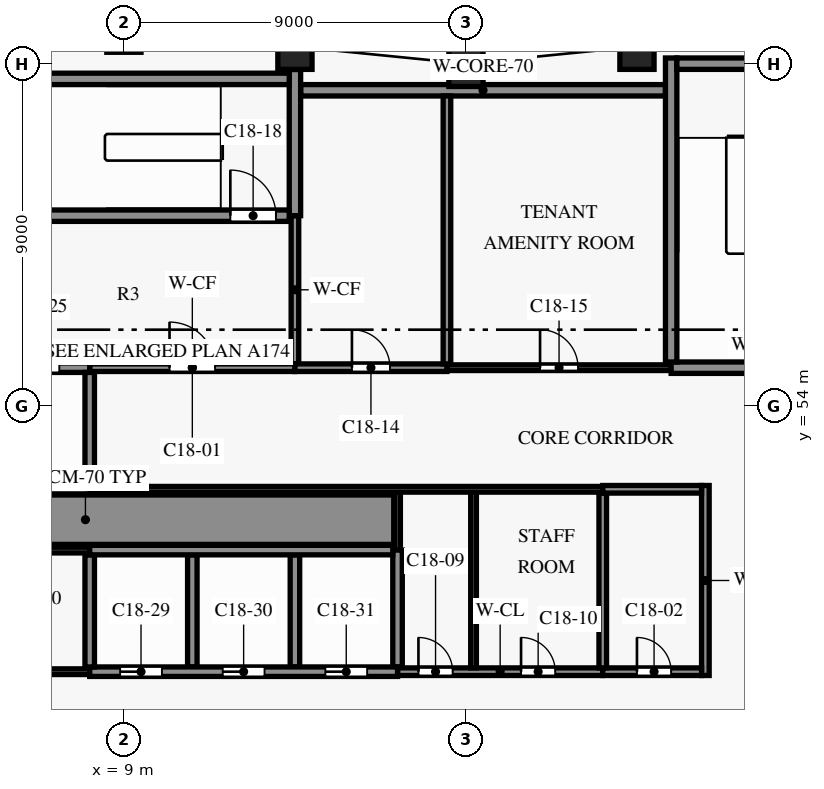
"""IFC4 building model, lengths in metres.
Left out: names, types, materials, properties, quantities, classifications, styles, units other than length and angle.
Written with IfcOpenShell. Run it as: python <this file> out.ifc"""

import sys

from ifc_helpers import new_model, si_unit, direction, frame, frame_2d, origin, origin_2d, place, context, subcontext, project, spatial, rectangle, extrude, element, fill, save


model = new_model("IFC4")
c1 = context("Model", 3, precision=1e-05, world=origin(), true_north=direction((0.0, 1.0)))
c2 = subcontext(c1, "Body", "Model", "MODEL_VIEW")
j1 = project(units=[si_unit("LENGTHUNIT", "METRE"), si_unit("PLANEANGLEUNIT", "RADIAN")], contexts=[c1])
p1 = place(None, origin())
s1 = spatial("IfcSite", under=j1, at=p1, CompositionType="ELEMENT")
p2 = place(p1, origin())
s2 = spatial("IfcBuilding", under=s1, at=p2, CompositionType="ELEMENT")
p3 = place(p2, frame((0.0, 0.0, 130.3)))
s3 = spatial("IfcBuildingStorey", under=s2, at=p3, CompositionType="ELEMENT", Elevation=130.3)
for number, where, z_axis, x_axis in (
    (1, (22.5, 63.45, 0.0), (0.0, 0.0, 1.0), (-0.995, -0.1, 0.0)),
    (2, (18.0, 63.0, 0.0), (0.0, 0.0, 1.0), (-1.0, 0.0, 0.0)),
    (3, (13.5, 63.45, 0.0), (0.0, 0.0, 1.0), (-0.995, 0.1, 0.0)),
    (4, (9.0, 63.9, 0.0), (0.0, 0.0, 1.0), (-1.0, 0.0, 0.0)),
):
    element("IfcColumn", number, at=place(p3, frame(where, z_axis=z_axis, x_axis=x_axis)), inside=s3, PredefinedType="COLUMN", context=c2, shape_type="SweptSolid", body=[
        extrude(rectangle(XDim=0.9, YDim=1.2, at=origin_2d()), origin(), (0.0, 0.0, 1.0), 3.8),
    ])
p4 = place(p3, frame((16.2, 47.0, 0.0), z_axis=(0.0, 0.0, 1.0), x_axis=(1.0, 0.0, 0.0)))
e5 = element("IfcWall", 5, at=p4, inside=s3, PredefinedType="PARTITIONING", context=c2, shape_type="SweptSolid", body=[
    extrude(rectangle(XDim=5.4, YDim=0.2, at=frame_2d((2.7, 0.0))), origin(), (0.0, 0.0, 1.0), 3.5),
])
p5 = place(p4, frame((0.55, 0.0, 0.0)))
e6 = element("IfcOpeningElement", 6, at=p5, cuts=e5, PredefinedType="OPENING", context=c2, shape_type="SweptSolid", body=[
    extrude(rectangle(XDim=0.9, YDim=2.1, at=frame_2d((0.45, 1.05))), frame((0.0, 0.11, 0.0), z_axis=(0.0, -1.0, 0.0), x_axis=(1.0, 0.0, 0.0)), (0.0, 0.0, 1.0), 0.22),
])
p6 = place(p4, frame((3.25, 0.0, 0.0)))
e7 = element("IfcOpeningElement", 7, at=p6, cuts=e5, PredefinedType="OPENING", context=c2, shape_type="SweptSolid", body=[
    extrude(rectangle(XDim=0.9, YDim=2.1, at=frame_2d((0.45, 1.05))), frame((0.0, 0.11, 0.0), z_axis=(0.0, -1.0, 0.0), x_axis=(1.0, 0.0, 0.0)), (0.0, 0.0, 1.0), 0.22),
])
p7 = place(p3, frame((0.15, 47.0, 0.0), z_axis=(0.0, 0.0, 1.0), x_axis=(1.0, 0.0, 0.0)))
e8 = element("IfcWall", 8, at=p7, inside=s3, PredefinedType="PARTITIONING", context=c2, shape_type="SweptSolid", body=[
    extrude(rectangle(XDim=7.95, YDim=0.15, at=frame_2d((3.975, 0.0))), origin(), (0.0, 0.0, 1.0), 3.5),
])
p8 = place(p7, frame((0.725, 0.0, 0.0)))
e9 = element("IfcOpeningElement", 9, at=p8, cuts=e8, PredefinedType="OPENING", context=c2, shape_type="SweptSolid", body=[
    extrude(rectangle(XDim=0.9, YDim=2.1, at=frame_2d((0.45, 1.05))), frame((0.0, 0.085, 0.0), z_axis=(0.0, -1.0, 0.0), x_axis=(1.0, 0.0, 0.0)), (0.0, 0.0, 1.0), 0.17),
])
p9 = place(p7, frame((4.45, 0.0, 0.0)))
e10 = element("IfcOpeningElement", 10, at=p9, cuts=e8, PredefinedType="OPENING", context=c2, shape_type="SweptSolid", body=[
    extrude(rectangle(XDim=0.9, YDim=2.1, at=frame_2d((0.45, 1.05))), frame((0.0, 0.085, 0.0), z_axis=(0.0, -1.0, 0.0), x_axis=(1.0, 0.0, 0.0)), (0.0, 0.0, 1.0), 0.17),
])
p10 = place(p3, frame((21.6, 47.0, 0.0), z_axis=(0.0, 0.0, 1.0), x_axis=(1.0, 0.0, 0.0)))
e11 = element("IfcWall", 11, at=p10, inside=s3, PredefinedType="PARTITIONING", context=c2, shape_type="SweptSolid", body=[
    extrude(rectangle(XDim=2.6, YDim=0.2, at=frame_2d((1.3, 0.0))), origin(), (0.0, 0.0, 1.0), 3.5),
])
p11 = place(p10, frame((0.9, 0.0, 0.0)))
e12 = element("IfcOpeningElement", 12, at=p11, cuts=e11, PredefinedType="OPENING", context=c2, shape_type="SweptSolid", body=[
    extrude(rectangle(XDim=0.9, YDim=2.1, at=frame_2d((0.45, 1.05))), frame((0.0, 0.11, 0.0), z_axis=(0.0, -1.0, 0.0), x_axis=(1.0, 0.0, 0.0)), (0.0, 0.0, 1.0), 0.22),
])
p12 = place(p3, frame((8.1, 47.0, 0.0), z_axis=(0.0, 0.0, 1.0), x_axis=(1.0, 0.0, 0.0)))
e13 = element("IfcWall", 13, at=p12, inside=s3, PredefinedType="SHEAR", context=c2, shape_type="SweptSolid", body=[
    extrude(rectangle(XDim=8.1, YDim=0.25, at=frame_2d((4.05, 0.0))), origin(), (0.0, 0.0, 1.0), 3.5),
])
p13 = place(p12, frame((0.8, 0.0, 0.0)))
e14 = element("IfcOpeningElement", 14, at=p13, cuts=e13, PredefinedType="OPENING", context=c2, shape_type="SweptSolid", body=[
    extrude(rectangle(XDim=1.1, YDim=2.1, at=frame_2d((0.55, 1.05))), frame((0.0, 0.135, 0.0), z_axis=(0.0, -1.0, 0.0), x_axis=(1.0, 0.0, 0.0)), (0.0, 0.0, 1.0), 0.27),
])
p14 = place(p12, frame((3.5, 0.0, 0.0)))
e15 = element("IfcOpeningElement", 15, at=p14, cuts=e13, PredefinedType="OPENING", context=c2, shape_type="SweptSolid", body=[
    extrude(rectangle(XDim=1.1, YDim=2.1, at=frame_2d((0.55, 1.05))), frame((0.0, 0.135, 0.0), z_axis=(0.0, -1.0, 0.0), x_axis=(1.0, 0.0, 0.0)), (0.0, 0.0, 1.0), 0.27),
])
p15 = place(p12, frame((6.2, 0.0, 0.0)))
e16 = element("IfcOpeningElement", 16, at=p15, cuts=e13, PredefinedType="OPENING", context=c2, shape_type="SweptSolid", body=[
    extrude(rectangle(XDim=1.1, YDim=2.1, at=frame_2d((0.55, 1.05))), frame((0.0, 0.135, 0.0), z_axis=(0.0, -1.0, 0.0), x_axis=(1.0, 0.0, 0.0)), (0.0, 0.0, 1.0), 0.27),
])
p16 = place(p3, frame((0.15, 50.2, 0.0), z_axis=(0.0, 0.0, 1.0), x_axis=(1.0, 0.0, 0.0)))
e17 = element("IfcWall", 17, at=p16, inside=s3, PredefinedType="PARTITIONING", context=c2, shape_type="SweptSolid", body=[
    extrude(rectangle(XDim=7.95, YDim=0.15, at=frame_2d((3.975, 0.0))), origin(), (0.0, 0.0, 1.0), 3.5),
])
p17 = place(p3, frame((8.1, 50.2, 0.0), z_axis=(0.0, 0.0, 1.0), x_axis=(1.0, 0.0, 0.0)))
e18 = element("IfcWall", 18, at=p17, inside=s3, PredefinedType="SHEAR", context=c2, shape_type="SweptSolid", body=[
    extrude(rectangle(XDim=7.975, YDim=0.25, at=frame_2d((3.987, 0.0))), origin(), (0.0, 0.0, 1.0), 3.5),
])
p18 = place(p3, frame((-0.125, 51.0, 0.0), z_axis=(0.0, 0.0, 1.0), x_axis=(1.0, 0.0, 0.0)))
e19 = element("IfcWall", 19, at=p18, inside=s3, PredefinedType="SHEAR", context=c2, shape_type="SweptSolid", body=[
    extrude(rectangle(XDim=16.225, YDim=1.3, at=frame_2d((8.113, 0.0))), origin(), (0.0, 0.0, 1.0), 3.5),
])
p19 = place(p3, frame((8.1, 51.8, 0.0), z_axis=(0.0, 0.0, 1.0), x_axis=(1.0, 0.0, 0.0)))
e20 = element("IfcWall", 20, at=p19, inside=s3, PredefinedType="PARTITIONING", context=c2, shape_type="SweptSolid", body=[
    extrude(rectangle(XDim=13.5, YDim=0.15, at=frame_2d((6.75, 0.0))), origin(), (0.0, 0.0, 1.0), 3.5),
])
p20 = place(p3, frame((21.6, 51.8, 0.0), z_axis=(0.0, 0.0, 1.0), x_axis=(1.0, 0.0, 0.0)))
e21 = element("IfcWall", 21, at=p20, inside=s3, PredefinedType="PARTITIONING", context=c2, shape_type="SweptSolid", body=[
    extrude(rectangle(XDim=2.6, YDim=0.2, at=frame_2d((1.3, 0.0))), origin(), (0.0, 0.0, 1.0), 3.5),
])
p21 = place(p3, frame((0.125, 51.8, 0.0), z_axis=(0.0, 0.0, 1.0), x_axis=(1.0, 0.0, 0.0)))
e22 = element("IfcWall", 22, at=p21, inside=s3, PredefinedType="SHEAR", context=c2, shape_type="SweptSolid", body=[
    extrude(rectangle(XDim=7.975, YDim=0.25, at=frame_2d((3.988, 0.0))), origin(), (0.0, 0.0, 1.0), 3.5),
])
p22 = place(p3, frame((8.1, 55.0, 0.0), z_axis=(0.0, 0.0, 1.0), x_axis=(1.0, 0.0, 0.0)))
e23 = element("IfcWall", 23, at=p22, inside=s3, PredefinedType="PARTITIONING", context=c2, shape_type="SweptSolid", body=[
    extrude(rectangle(XDim=5.4, YDim=0.2, at=frame_2d((2.7, 0.0))), origin(), (0.0, 0.0, 1.0), 3.5),
])
p23 = place(p22, frame((2.1, 0.0, 0.0)))
e24 = element("IfcOpeningElement", 24, at=p23, cuts=e23, PredefinedType="OPENING", context=c2, shape_type="SweptSolid", body=[
    extrude(rectangle(XDim=1.2, YDim=2.2, at=frame_2d((0.6, 1.1))), frame((0.0, 0.11, 0.0), z_axis=(0.0, -1.0, 0.0), x_axis=(1.0, 0.0, 0.0)), (0.0, 0.0, 1.0), 0.22),
])
p24 = place(p3, frame((17.5, 55.0, 0.0), z_axis=(0.0, 0.0, 1.0), x_axis=(1.0, 0.0, 0.0)))
e25 = element("IfcWall", 25, at=p24, inside=s3, PredefinedType="PARTITIONING", context=c2, shape_type="SweptSolid", body=[
    extrude(rectangle(XDim=5.9, YDim=0.15, at=frame_2d((2.95, 0.0))), origin(), (0.0, 0.0, 1.0), 3.5),
])
p25 = place(p24, frame((2.45, 0.0, 0.0)))
e26 = element("IfcOpeningElement", 26, at=p25, cuts=e25, PredefinedType="OPENING", context=c2, shape_type="SweptSolid", body=[
    extrude(rectangle(XDim=1.0, YDim=2.1, at=frame_2d((0.5, 1.05))), frame((0.0, 0.085, 0.0), z_axis=(0.0, -1.0, 0.0), x_axis=(1.0, 0.0, 0.0)), (0.0, 0.0, 1.0), 0.17),
])
p26 = place(p3, frame((13.5, 55.0, 0.0), z_axis=(0.0, 0.0, 1.0), x_axis=(1.0, 0.0, 0.0)))
e27 = element("IfcWall", 27, at=p26, inside=s3, PredefinedType="PARTITIONING", context=c2, shape_type="SweptSolid", body=[
    extrude(rectangle(XDim=4.0, YDim=0.2, at=frame_2d((2.0, 0.0))), origin(), (0.0, 0.0, 1.0), 3.5),
])
p27 = place(p26, frame((1.5, 0.0, 0.0)))
e28 = element("IfcOpeningElement", 28, at=p27, cuts=e27, PredefinedType="OPENING", context=c2, shape_type="SweptSolid", body=[
    extrude(rectangle(XDim=1.0, YDim=2.1, at=frame_2d((0.5, 1.05))), frame((0.0, 0.11, 0.0), z_axis=(0.0, -1.0, 0.0), x_axis=(1.0, 0.0, 0.0)), (0.0, 0.0, 1.0), 0.22),
])
p28 = place(p3, frame((0.15, 55.0, 0.0), z_axis=(0.0, 0.0, 1.0), x_axis=(1.0, 0.0, 0.0)))
e29 = element("IfcWall", 29, at=p28, inside=s3, PredefinedType="SHEAR", context=c2, shape_type="SweptSolid", body=[
    extrude(rectangle(XDim=7.95, YDim=0.25, at=frame_2d((3.975, 0.0))), origin(), (0.0, 0.0, 1.0), 3.5),
])
p29 = place(p28, frame((0.65, 0.0, 0.0)))
e30 = element("IfcOpeningElement", 30, at=p29, cuts=e29, PredefinedType="OPENING", context=c2, shape_type="SweptSolid", body=[
    extrude(rectangle(XDim=1.1, YDim=2.1, at=frame_2d((0.55, 1.05))), frame((0.0, 0.135, 0.0), z_axis=(0.0, -1.0, 0.0), x_axis=(1.0, 0.0, 0.0)), (0.0, 0.0, 1.0), 0.27),
])
p30 = place(p28, frame((3.35, 0.0, 0.0)))
e31 = element("IfcOpeningElement", 31, at=p30, cuts=e29, PredefinedType="OPENING", context=c2, shape_type="SweptSolid", body=[
    extrude(rectangle(XDim=1.1, YDim=2.1, at=frame_2d((0.55, 1.05))), frame((0.0, 0.135, 0.0), z_axis=(0.0, -1.0, 0.0), x_axis=(1.0, 0.0, 0.0)), (0.0, 0.0, 1.0), 0.27),
])
p31 = place(p28, frame((6.05, 0.0, 0.0)))
e32 = element("IfcOpeningElement", 32, at=p31, cuts=e29, PredefinedType="OPENING", context=c2, shape_type="SweptSolid", body=[
    extrude(rectangle(XDim=1.1, YDim=2.1, at=frame_2d((0.55, 1.05))), frame((0.0, 0.135, 0.0), z_axis=(0.0, -1.0, 0.0), x_axis=(1.0, 0.0, 0.0)), (0.0, 0.0, 1.0), 0.27),
])
p32 = place(p3, frame((23.4, 55.0, 0.0), z_axis=(0.0, 0.0, 1.0), x_axis=(1.0, 0.0, 0.0)))
e33 = element("IfcWall", 33, at=p32, inside=s3, PredefinedType="SHEAR", context=c2, shape_type="SweptSolid", body=[
    extrude(rectangle(XDim=3.45, YDim=0.3, at=frame_2d((1.725, 0.0))), origin(), (0.0, 0.0, 1.0), 3.5),
])
p33 = place(p3, frame((5.1, 59.0, 0.0), z_axis=(0.0, 0.0, 1.0), x_axis=(1.0, 0.0, 0.0)))
e34 = element("IfcWall", 34, at=p33, inside=s3, PredefinedType="SHEAR", context=c2, shape_type="SweptSolid", body=[
    extrude(rectangle(XDim=8.25, YDim=0.3, at=frame_2d((4.125, 0.0))), origin(), (0.0, 0.0, 1.0), 3.5),
])
p34 = place(p33, frame((6.7, 0.0, 0.0)))
e35 = element("IfcOpeningElement", 35, at=p34, cuts=e34, PredefinedType="OPENING", context=c2, shape_type="SweptSolid", body=[
    extrude(rectangle(XDim=1.2, YDim=2.2, at=frame_2d((0.6, 1.1))), frame((0.0, 0.16, 0.0), z_axis=(0.0, -1.0, 0.0), x_axis=(1.0, 0.0, 0.0)), (0.0, 0.0, 1.0), 0.32),
])
p35 = place(p3, frame((13.65, 62.3, 0.0), z_axis=(0.0, 0.0, 1.0), x_axis=(1.0, 0.0, 0.0)))
e36 = element("IfcWall", 36, at=p35, inside=s3, PredefinedType="SHEAR", context=c2, shape_type="SweptSolid", body=[
    extrude(rectangle(XDim=9.6, YDim=0.3, at=frame_2d((4.8, 0.0))), origin(), (0.0, 0.0, 1.0), 3.5),
])
p36 = place(p3, frame((5.65, 62.6, 0.0), z_axis=(0.0, 0.0, 1.0), x_axis=(1.0, 0.0, 0.0)))
e37 = element("IfcWall", 37, at=p36, inside=s3, PredefinedType="SHEAR", context=c2, shape_type="SweptSolid", body=[
    extrude(rectangle(XDim=7.7, YDim=0.3, at=frame_2d((3.85, 0.0))), origin(), (0.0, 0.0, 1.0), 3.5),
])
p37 = place(p3, frame((23.55, 63.0, 0.0), z_axis=(0.0, 0.0, 1.0), x_axis=(1.0, 0.0, 0.0)))
e38 = element("IfcWall", 38, at=p37, inside=s3, PredefinedType="SHEAR", context=c2, shape_type="SweptSolid", body=[
    extrude(rectangle(XDim=3.3, YDim=0.3, at=frame_2d((1.65, 0.0))), origin(), (0.0, 0.0, 1.0), 3.5),
])
for number, where, z_axis, x_axis in (
    (39, (8.1, 47.125, 0.0), (0.0, 0.0, 1.0), (0.0, 1.0, 0.0)),
    (40, (8.1, 51.925, 0.0), (0.0, 0.0, 1.0), (0.0, 1.0, 0.0)),
    (41, (10.8, 47.125, 0.0), (0.0, 0.0, 1.0), (0.0, 1.0, 0.0)),
):
    element("IfcWall", number, at=place(p3, frame(where, z_axis=z_axis, x_axis=x_axis)), inside=s3, PredefinedType="SHEAR", context=c2, shape_type="SweptSolid", body=[
        extrude(rectangle(XDim=2.95, YDim=0.25, at=frame_2d((1.475, 0.0))), origin(), (0.0, 0.0, 1.0), 3.5),
    ])
p38 = place(p3, frame((13.5, 55.1, 0.0), z_axis=(0.0, 0.0, 1.0), x_axis=(0.0, 1.0, 0.0)))
e42 = element("IfcWall", 42, at=p38, inside=s3, PredefinedType="PARTITIONING", context=c2, shape_type="SweptSolid", body=[
    extrude(rectangle(XDim=3.9, YDim=0.2, at=frame_2d((1.95, 0.0))), origin(), (0.0, 0.0, 1.0), 3.5),
])
p39 = place(p3, frame((13.5, 47.125, 0.0), z_axis=(0.0, 0.0, 1.0), x_axis=(0.0, 1.0, 0.0)))
e43 = element("IfcWall", 43, at=p39, inside=s3, PredefinedType="SHEAR", context=c2, shape_type="SweptSolid", body=[
    extrude(rectangle(XDim=2.95, YDim=0.25, at=frame_2d((1.475, 0.0))), origin(), (0.0, 0.0, 1.0), 3.5),
])
p40 = place(p3, frame((13.5, 59.0, 0.0), z_axis=(0.0, 0.0, 1.0), x_axis=(0.0, 1.0, 0.0)))
e44 = element("IfcWall", 44, at=p40, inside=s3, PredefinedType="SHEAR", context=c2, shape_type="SweptSolid", body=[
    extrude(rectangle(XDim=3.847, YDim=0.3, at=frame_2d((1.923, 0.0))), origin(), (0.0, 0.0, 1.0), 3.5),
])
p41 = place(p3, frame((16.2, 50.2, 0.0), z_axis=(0.0, 0.0, 1.0), x_axis=(0.0, 1.0, 0.0)))
e45 = element("IfcWall", 45, at=p41, inside=s3, PredefinedType="PARTITIONING", context=c2, shape_type="SweptSolid", body=[
    extrude(rectangle(XDim=1.525, YDim=0.15, at=frame_2d((0.763, 0.0))), origin(), (0.0, 0.0, 1.0), 3.5),
])
p42 = place(p3, frame((16.2, 47.125, 0.0), z_axis=(0.0, 0.0, 1.0), x_axis=(0.0, 1.0, 0.0)))
e46 = element("IfcWall", 46, at=p42, inside=s3, PredefinedType="SHEAR", context=c2, shape_type="SweptSolid", body=[
    extrude(rectangle(XDim=3.075, YDim=0.25, at=frame_2d((1.538, 0.0))), origin(), (0.0, 0.0, 1.0), 3.5),
])
p43 = place(p3, frame((17.5, 55.1, 0.0), z_axis=(0.0, 0.0, 1.0), x_axis=(0.0, 1.0, 0.0)))
e47 = element("IfcWall", 47, at=p43, inside=s3, PredefinedType="PARTITIONING", context=c2, shape_type="SweptSolid", body=[
    extrude(rectangle(XDim=7.05, YDim=0.2, at=frame_2d((3.525, 0.0))), origin(), (0.0, 0.0, 1.0), 3.5),
])
p44 = place(p3, frame((18.2, 47.1, 0.0), z_axis=(0.0, 0.0, 1.0), x_axis=(0.0, 1.0, 0.0)))
e48 = element("IfcWall", 48, at=p44, inside=s3, PredefinedType="PARTITIONING", context=c2, shape_type="SweptSolid", body=[
    extrude(rectangle(XDim=4.625, YDim=0.15, at=frame_2d((2.312, 0.0))), origin(), (0.0, 0.0, 1.0), 3.5),
])
p45 = place(p3, frame((21.6, 47.1, 0.0), z_axis=(0.0, 0.0, 1.0), x_axis=(0.0, 1.0, 0.0)))
e49 = element("IfcWall", 49, at=p45, inside=s3, PredefinedType="PARTITIONING", context=c2, shape_type="SweptSolid", body=[
    extrude(rectangle(XDim=4.6, YDim=0.2, at=frame_2d((2.3, 0.0))), origin(), (0.0, 0.0, 1.0), 3.5),
])
p46 = place(p3, frame((23.4, 55.15, 0.0), z_axis=(0.0, 0.0, 1.0), x_axis=(0.0, 1.0, 0.0)))
e50 = element("IfcWall", 50, at=p46, inside=s3, PredefinedType="SHEAR", context=c2, shape_type="SweptSolid", body=[
    extrude(rectangle(XDim=8.0, YDim=0.3, at=frame_2d((4.0, 0.0))), origin(), (0.0, 0.0, 1.0), 3.5),
])
p47 = place(p3, frame((24.3, 46.9, 0.0), z_axis=(0.0, 0.0, 1.0), x_axis=(0.0, 1.0, 0.0)))
e51 = element("IfcWall", 51, at=p47, inside=s3, PredefinedType="SHEAR", context=c2, shape_type="SweptSolid", body=[
    extrude(rectangle(XDim=5.0, YDim=0.2, at=frame_2d((2.5, 0.0))), origin(), (0.0, 0.0, 1.0), 3.5),
])
p48 = place(p23, origin())
e52 = element("IfcDoor", 52, at=p48, inside=s3, OperationType="SINGLE_SWING_RIGHT", PredefinedType="DOOR", context=c2, shape_type="SweptSolid", body=[
    extrude(rectangle(XDim=1.2, YDim=2.2, at=frame_2d((0.6, 1.1))), frame((0.0, 0.025, 0.0), z_axis=(0.0, -1.0, 0.0), x_axis=(1.0, 0.0, 0.0)), (0.0, 0.0, 1.0), 0.05),
])
fill(e24, e52)
p49 = place(p11, origin())
e53 = element("IfcDoor", 53, at=p49, inside=s3, OperationType="SINGLE_SWING_LEFT", PredefinedType="DOOR", context=c2, shape_type="SweptSolid", body=[
    extrude(rectangle(XDim=0.9, YDim=2.1, at=frame_2d((0.45, 1.05))), frame((0.0, 0.025, 0.0), z_axis=(0.0, -1.0, 0.0), x_axis=(1.0, 0.0, 0.0)), (0.0, 0.0, 1.0), 0.05),
])
fill(e12, e53)
p50 = place(p5, origin())
e54 = element("IfcDoor", 54, at=p50, inside=s3, OperationType="SINGLE_SWING_LEFT", PredefinedType="DOOR", context=c2, shape_type="SweptSolid", body=[
    extrude(rectangle(XDim=0.9, YDim=2.1, at=frame_2d((0.45, 1.05))), frame((0.0, 0.025, 0.0), z_axis=(0.0, -1.0, 0.0), x_axis=(1.0, 0.0, 0.0)), (0.0, 0.0, 1.0), 0.05),
])
fill(e6, e54)
p51 = place(p6, origin())
e55 = element("IfcDoor", 55, at=p51, inside=s3, OperationType="SINGLE_SWING_RIGHT", PredefinedType="DOOR", context=c2, shape_type="SweptSolid", body=[
    extrude(rectangle(XDim=0.9, YDim=2.1, at=frame_2d((0.45, 1.05))), frame((0.0, 0.025, 0.0), z_axis=(0.0, -1.0, 0.0), x_axis=(1.0, 0.0, 0.0)), (0.0, 0.0, 1.0), 0.05),
])
fill(e7, e55)
p52 = place(p27, origin())
e56 = element("IfcDoor", 56, at=p52, inside=s3, OperationType="SINGLE_SWING_LEFT", PredefinedType="DOOR", context=c2, shape_type="SweptSolid", body=[
    extrude(rectangle(XDim=1.0, YDim=2.1, at=frame_2d((0.5, 1.05))), frame((0.0, 0.025, 0.0), z_axis=(0.0, -1.0, 0.0), x_axis=(1.0, 0.0, 0.0)), (0.0, 0.0, 1.0), 0.05),
])
fill(e28, e56)
p53 = place(p25, origin())
e57 = element("IfcDoor", 57, at=p53, inside=s3, OperationType="SINGLE_SWING_RIGHT", PredefinedType="DOOR", context=c2, shape_type="SweptSolid", body=[
    extrude(rectangle(XDim=1.0, YDim=2.1, at=frame_2d((0.5, 1.05))), frame((0.0, 0.025, 0.0), z_axis=(0.0, -1.0, 0.0), x_axis=(1.0, 0.0, 0.0)), (0.0, 0.0, 1.0), 0.05),
])
fill(e26, e57)
p54 = place(p34, origin())
e58 = element("IfcDoor", 58, at=p54, inside=s3, OperationType="SINGLE_SWING_RIGHT", PredefinedType="DOOR", context=c2, shape_type="SweptSolid", body=[
    extrude(rectangle(XDim=1.2, YDim=2.2, at=frame_2d((0.6, 1.1))), frame((0.0, 0.025, 0.0), z_axis=(0.0, -1.0, 0.0), x_axis=(1.0, 0.0, 0.0)), (0.0, 0.0, 1.0), 0.05),
])
fill(e35, e58)
p55 = place(p31, origin())
e59 = element("IfcDoor", 59, at=p55, inside=s3, OperationType="DOUBLE_DOOR_SLIDING", PredefinedType="DOOR", context=c2, shape_type="SweptSolid", body=[
    extrude(rectangle(XDim=1.1, YDim=2.1, at=frame_2d((0.55, 1.05))), frame((0.0, 0.025, 0.0), z_axis=(0.0, -1.0, 0.0), x_axis=(1.0, 0.0, 0.0)), (0.0, 0.0, 1.0), 0.05),
])
fill(e32, e59)
p56 = place(p13, origin())
e60 = element("IfcDoor", 60, at=p56, inside=s3, OperationType="DOUBLE_DOOR_SLIDING", PredefinedType="DOOR", context=c2, shape_type="SweptSolid", body=[
    extrude(rectangle(XDim=1.1, YDim=2.1, at=frame_2d((0.55, 1.05))), frame((0.0, 0.025, 0.0), z_axis=(0.0, -1.0, 0.0), x_axis=(1.0, 0.0, 0.0)), (0.0, 0.0, 1.0), 0.05),
])
fill(e14, e60)
p57 = place(p14, origin())
e61 = element("IfcDoor", 61, at=p57, inside=s3, OperationType="DOUBLE_DOOR_SLIDING", PredefinedType="DOOR", context=c2, shape_type="SweptSolid", body=[
    extrude(rectangle(XDim=1.1, YDim=2.1, at=frame_2d((0.55, 1.05))), frame((0.0, 0.025, 0.0), z_axis=(0.0, -1.0, 0.0), x_axis=(1.0, 0.0, 0.0)), (0.0, 0.0, 1.0), 0.05),
])
fill(e15, e61)
p58 = place(p15, origin())
e62 = element("IfcDoor", 62, at=p58, inside=s3, OperationType="DOUBLE_DOOR_SLIDING", PredefinedType="DOOR", context=c2, shape_type="SweptSolid", body=[
    extrude(rectangle(XDim=1.1, YDim=2.1, at=frame_2d((0.55, 1.05))), frame((0.0, 0.025, 0.0), z_axis=(0.0, -1.0, 0.0), x_axis=(1.0, 0.0, 0.0)), (0.0, 0.0, 1.0), 0.05),
])
fill(e16, e62)
save(model, sys.argv[1])
